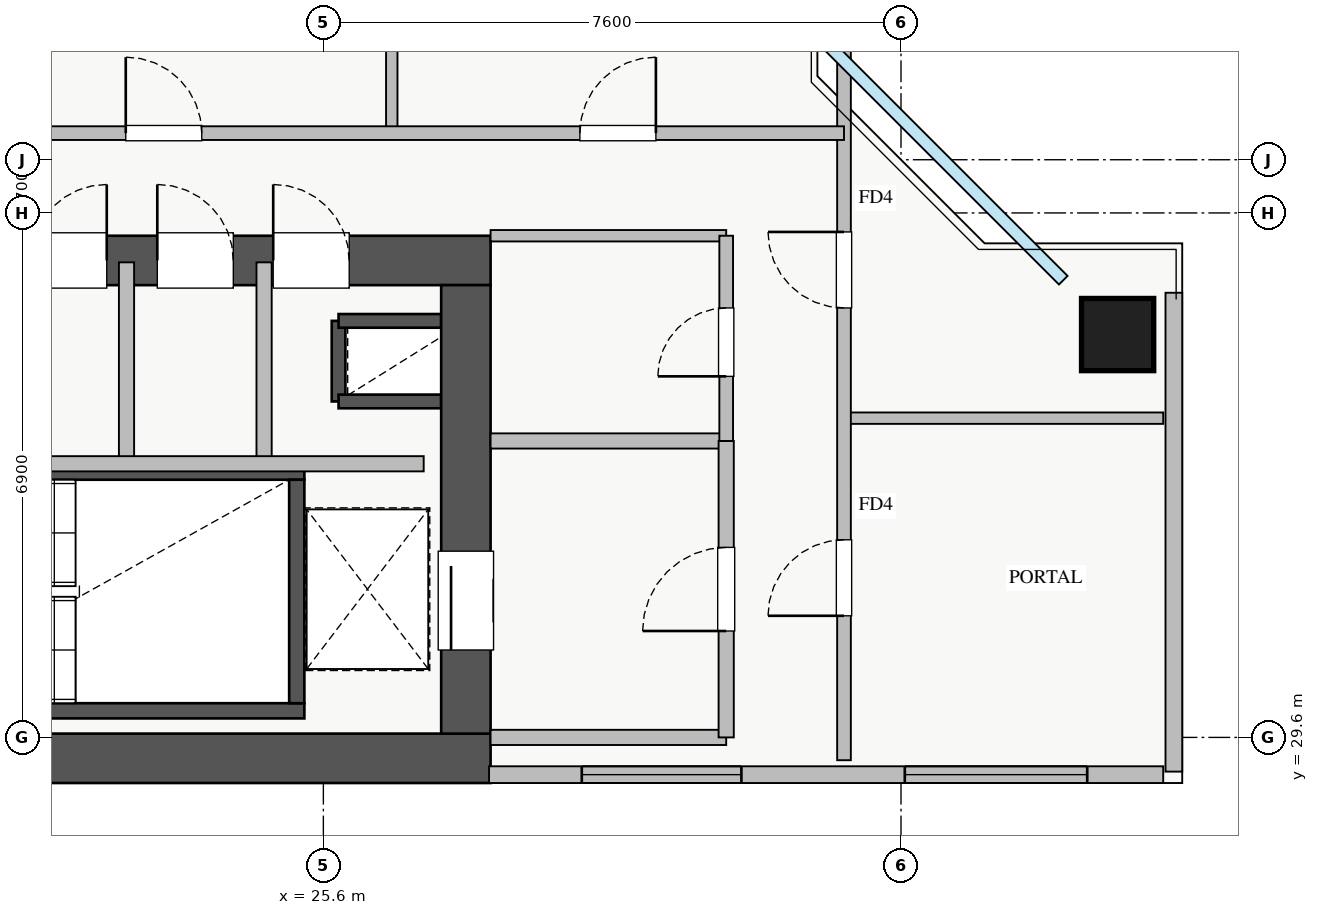
"""IFC4 building model, lengths in metres.
Left out: names, types, materials, properties, quantities, classifications, styles, units other than length and angle.
Written with IfcOpenShell. Run it as: python <this file> out.ifc"""

import sys

from ifc_helpers import new_model, si_unit, direction, frame, frame_2d, origin, origin_2d, place, context, subcontext, project, spatial, rectangle, extrude, source, transform, mapped, element, fill, save


model = new_model("IFC4")
c1 = context("Model", 3, precision=1e-05, world=origin(), true_north=direction((0.0, 1.0)))
c2 = subcontext(c1, "Body", "Model", "MODEL_VIEW")
j1 = project(units=[si_unit("LENGTHUNIT", "METRE"), si_unit("PLANEANGLEUNIT", "RADIAN")], contexts=[c1])
p1 = place(None, origin())
s1 = spatial("IfcSite", under=j1, at=p1, CompositionType="ELEMENT")
p2 = place(p1, origin())
s2 = spatial("IfcBuilding", under=s1, at=p2, CompositionType="ELEMENT")
p3 = place(p2, frame((0.0, 0.0, 163.25)))
s3 = spatial("IfcBuildingStorey", under=s2, at=p3, CompositionType="ELEMENT", Elevation=163.25)
p4 = place(p3, frame((25.8, 34.02, 0.0), z_axis=(0.0, 0.0, 1.0), x_axis=(0.0, 1.0, 0.0)))
e1 = element("IfcWall", 1, at=p4, inside=s3, PredefinedType="SHEAR", context=c2, shape_type="SweptSolid", body=[
    extrude(rectangle(XDim=1.06, YDim=0.18, at=frame_2d((0.53, 0.0))), origin(), (0.0, 0.0, 1.0), 3.07),
])
for number, where, z_axis, x_axis in (
    (2, (25.8, 35.08, 0.0), (0.0, 0.0, 1.0), (1.0, 0.0, 0.0)),
    (3, (25.8, 34.02, 0.0), (0.0, 0.0, 1.0), (1.0, 0.0, 0.0)),
):
    element("IfcWall", number, at=place(p3, frame(where, z_axis=z_axis, x_axis=x_axis)), inside=s3, PredefinedType="SHEAR", context=c2, shape_type="SweptSolid", body=[
        extrude(rectangle(XDim=1.35, YDim=0.18, at=frame_2d((0.675, 0.0))), origin(), (0.0, 0.0, 1.0), 3.07),
    ])
p5 = place(p3, frame((18.2, 29.95, 0.0), z_axis=(0.0, 0.0, 1.0), x_axis=(1.0, 0.0, 0.0)))
e4 = element("IfcWall", 4, at=p5, inside=s3, PredefinedType="SHEAR", context=c2, shape_type="SweptSolid", body=[
    extrude(rectangle(XDim=7.15, YDim=0.2, at=frame_2d((3.575, 0.0))), origin(), (0.0, 0.0, 1.0), 3.25),
])
p6 = place(p3, frame((18.2, 33.09, 0.0), z_axis=(0.0, 0.0, 1.0), x_axis=(1.0, 0.0, 0.0)))
e5 = element("IfcWall", 5, at=p6, inside=s3, PredefinedType="SHEAR", context=c2, shape_type="SweptSolid", body=[
    extrude(rectangle(XDim=7.15, YDim=0.2, at=frame_2d((3.575, 0.0))), origin(), (0.0, 0.0, 1.0), 3.25),
])
p7 = place(p6, frame((0.35, 0.0, 0.0)))
e6 = element("IfcOpeningElement", 6, at=p7, cuts=e5, PredefinedType="OPENING", context=c2, shape_type="SweptSolid", body=[
    extrude(rectangle(XDim=1.1, YDim=2.05, at=frame_2d((0.55, 1.025))), frame((0.0, 0.11, 0.0), z_axis=(0.0, -1.0, 0.0), x_axis=(1.0, 0.0, 0.0)), (0.0, 0.0, 1.0), 0.22),
])
p8 = place(p3, frame((25.25, 30.05, 0.0), z_axis=(0.0, 0.0, 1.0), x_axis=(0.0, 1.0, 0.0)))
e7 = element("IfcWall", 7, at=p8, inside=s3, PredefinedType="SHEAR", context=c2, shape_type="SweptSolid", body=[
    extrude(rectangle(XDim=2.94, YDim=0.2, at=frame_2d((1.47, 0.0))), origin(), (0.0, 0.0, 1.0), 3.25),
])
p9 = place(p3, frame((10.2, 29.325, 0.0), z_axis=(0.0, 0.0, 1.0), x_axis=(1.0, 0.0, 0.0)))
e8 = element("IfcWall", 8, at=p9, inside=s3, PredefinedType="SHEAR", context=c2, shape_type="SweptSolid", body=[
    extrude(rectangle(XDim=17.6, YDim=0.65, at=frame_2d((8.8, 0.0))), origin(), (0.0, 0.0, 1.0), 3.25),
])
p10 = place(p3, frame((10.2, 35.875, 0.0), z_axis=(0.0, 0.0, 1.0), x_axis=(1.0, 0.0, 0.0)))
e9 = element("IfcWall", 9, at=p10, inside=s3, PredefinedType="SHEAR", context=c2, shape_type="SweptSolid", body=[
    extrude(rectangle(XDim=17.6, YDim=0.65, at=frame_2d((8.8, 0.0))), origin(), (0.0, 0.0, 1.0), 3.25),
])
p11 = place(p10, frame((1.15, 0.0, 0.0)))
e10 = element("IfcOpeningElement", 10, at=p11, cuts=e9, PredefinedType="OPENING", context=c2, shape_type="SweptSolid", body=[
    extrude(rectangle(XDim=1.1, YDim=2.05, at=frame_2d((0.55, 1.025))), frame((0.0, 0.335, 0.0), z_axis=(0.0, -1.0, 0.0), x_axis=(1.0, 0.0, 0.0)), (0.0, 0.0, 1.0), 0.67),
])
p12 = place(p10, frame((8.3, 0.0, 0.0)))
e11 = element("IfcOpeningElement", 11, at=p12, cuts=e9, PredefinedType="OPENING", context=c2, shape_type="SweptSolid", body=[
    extrude(rectangle(XDim=1.1, YDim=2.05, at=frame_2d((0.55, 1.025))), frame((0.0, 0.335, 0.0), z_axis=(0.0, -1.0, 0.0), x_axis=(1.0, 0.0, 0.0)), (0.0, 0.0, 1.0), 0.67),
])
p13 = place(p10, frame((4.9, 0.0, 0.0)))
e12 = element("IfcOpeningElement", 12, at=p13, cuts=e9, PredefinedType="OPENING", context=c2, shape_type="SweptSolid", body=[
    extrude(rectangle(XDim=1.1, YDim=2.05, at=frame_2d((0.55, 1.025))), frame((0.0, 0.335, 0.0), z_axis=(0.0, -1.0, 0.0), x_axis=(1.0, 0.0, 0.0)), (0.0, 0.0, 1.0), 0.67),
])
p14 = place(p10, frame((14.74, 0.0, 0.0)))
e13 = element("IfcOpeningElement", 13, at=p14, cuts=e9, PredefinedType="OPENING", context=c2, shape_type="SweptSolid", body=[
    extrude(rectangle(XDim=1.0, YDim=2.05, at=frame_2d((0.5, 1.025))), frame((0.0, 0.335, 0.0), z_axis=(0.0, -1.0, 0.0), x_axis=(1.0, 0.0, 0.0)), (0.0, 0.0, 1.0), 0.67),
])
p15 = place(p10, frame((10.005, 0.0, 0.0)))
e14 = element("IfcOpeningElement", 14, at=p15, cuts=e9, PredefinedType="OPENING", context=c2, shape_type="SweptSolid", body=[
    extrude(rectangle(XDim=1.0, YDim=2.05, at=frame_2d((0.5, 1.025))), frame((0.0, 0.335, 0.0), z_axis=(0.0, -1.0, 0.0), x_axis=(1.0, 0.0, 0.0)), (0.0, 0.0, 1.0), 0.67),
])
p16 = place(p10, frame((11.55, 0.0, 0.0)))
e15 = element("IfcOpeningElement", 15, at=p16, cuts=e9, PredefinedType="OPENING", context=c2, shape_type="SweptSolid", body=[
    extrude(rectangle(XDim=1.0, YDim=2.05, at=frame_2d((0.5, 1.025))), frame((0.0, 0.335, 0.0), z_axis=(0.0, -1.0, 0.0), x_axis=(1.0, 0.0, 0.0)), (0.0, 0.0, 1.0), 0.67),
])
p17 = place(p10, frame((13.215, 0.0, 0.0)))
e16 = element("IfcOpeningElement", 16, at=p17, cuts=e9, PredefinedType="OPENING", context=c2, shape_type="SweptSolid", body=[
    extrude(rectangle(XDim=1.0, YDim=2.05, at=frame_2d((0.5, 1.025))), frame((0.0, 0.335, 0.0), z_axis=(0.0, -1.0, 0.0), x_axis=(1.0, 0.0, 0.0)), (0.0, 0.0, 1.0), 0.67),
])
p18 = place(p3, frame((27.475, 29.65, 0.0), z_axis=(0.0, 0.0, 1.0), x_axis=(0.0, 1.0, 0.0)))
e17 = element("IfcWall", 17, at=p18, inside=s3, PredefinedType="SHEAR", context=c2, shape_type="SweptSolid", body=[
    extrude(rectangle(XDim=5.9, YDim=0.65, at=frame_2d((2.95, 0.0))), origin(), (0.0, 0.0, 1.0), 3.25),
])
p19 = place(p18, frame((1.1, 0.0, 0.0)))
e18 = element("IfcOpeningElement", 18, at=p19, cuts=e17, PredefinedType="OPENING", context=c2, shape_type="SweptSolid", body=[
    extrude(rectangle(XDim=1.3, YDim=2.05, at=frame_2d((0.65, 1.025))), frame((0.0, 0.335, 0.0), z_axis=(0.0, -1.0, 0.0), x_axis=(1.0, 0.0, 0.0)), (0.0, 0.0, 1.0), 0.67),
])
m1 = source(origin(), c2, "Body", "SweptSolid", [
    extrude(rectangle(XDim=0.95, YDim=0.95, at=origin_2d()), origin(), (0.0, 0.0, 1.0), 3.25),
])
p20 = place(p3, frame((36.05, 34.9, 0.0), z_axis=(0.0, 0.0, 1.0), x_axis=(1.0, 0.0, 0.0)))
e19 = element("IfcColumn", 19, at=p20, inside=s3, PredefinedType="COLUMN", context=c2, shape_type="MappedRepresentation", body=[
    mapped(m1, transform((0.0, 0.0, 0.0), x_axis=(1.0, 0.0, 0.0), y_axis=(0.0, 1.0, 0.0), z_axis=(0.0, 0.0, 1.0), scale=1.0)),
])
p21 = place(p3, frame((27.78, 29.11, 0.0), z_axis=(0.0, 0.0, 1.0), x_axis=(1.0, 0.0, 0.0)))
e20 = element("IfcWall", 20, at=p21, inside=s3, PredefinedType="STANDARD", context=c2, shape_type="SweptSolid", body=[
    extrude(rectangle(XDim=8.87, YDim=0.22, at=frame_2d((4.435, 0.0))), origin(), (0.0, 0.0, 1.0), 2.61),
])
p22 = place(p21, frame((1.22, 0.0, 0.9)))
e21 = element("IfcOpeningElement", 21, at=p22, cuts=e20, PredefinedType="OPENING", context=c2, shape_type="SweptSolid", body=[
    extrude(rectangle(XDim=2.1, YDim=1.48, at=frame_2d((1.05, 0.74))), frame((0.0, 0.12, 0.0), z_axis=(0.0, -1.0, 0.0), x_axis=(1.0, 0.0, 0.0)), (0.0, 0.0, 1.0), 0.24),
])
p23 = place(p21, frame((5.47, 0.0, 0.9)))
e22 = element("IfcOpeningElement", 22, at=p23, cuts=e20, PredefinedType="OPENING", context=c2, shape_type="SweptSolid", body=[
    extrude(rectangle(XDim=2.4, YDim=1.48, at=frame_2d((1.2, 0.74))), frame((0.0, 0.12, 0.0), z_axis=(0.0, -1.0, 0.0), x_axis=(1.0, 0.0, 0.0)), (0.0, 0.0, 1.0), 0.24),
])
p24 = place(p3, frame((36.79, 29.15, 0.0), z_axis=(0.0, 0.0, 1.0), x_axis=(0.0, 1.0, 0.0)))
e23 = element("IfcWall", 23, at=p24, inside=s3, PredefinedType="STANDARD", context=c2, shape_type="SweptSolid", body=[
    extrude(rectangle(XDim=6.3, YDim=0.22, at=frame_2d((3.15, 0.0))), origin(), (0.0, 0.0, 1.0), 2.61),
])
for number, where, z_axis, x_axis in (
    (24, (27.8, 29.6, 0.0), (0.0, 0.0, 1.0), (1.0, 0.0, 0.0)),
    (25, (27.8, 33.5, 0.0), (0.0, 0.0, 1.0), (1.0, 0.0, 0.0)),
):
    element("IfcWall", number, at=place(p3, frame(where, z_axis=z_axis, x_axis=x_axis)), inside=s3, PredefinedType="PARTITIONING", context=c2, shape_type="SweptSolid", body=[
        extrude(rectangle(XDim=3.1, YDim=0.2, at=frame_2d((1.55, 0.0))), origin(), (0.0, 0.0, 1.0), 3.07),
    ])
p25 = place(p3, frame((30.9, 29.6, 0.0), z_axis=(0.0, 0.0, 1.0), x_axis=(0.0, 1.0, 0.0)))
e26 = element("IfcWall", 26, at=p25, inside=s3, PredefinedType="PARTITIONING", context=c2, shape_type="SweptSolid", body=[
    extrude(rectangle(XDim=3.9, YDim=0.2, at=frame_2d((1.95, 0.0))), origin(), (0.0, 0.0, 1.0), 3.07),
])
p26 = place(p25, frame((1.4, 0.0, 0.0)))
e27 = element("IfcOpeningElement", 27, at=p26, cuts=e26, PredefinedType="OPENING", context=c2, shape_type="SweptSolid", body=[
    extrude(rectangle(XDim=1.1, YDim=2.05, at=frame_2d((0.55, 1.025))), frame((0.0, 0.11, 0.0), z_axis=(0.0, -1.0, 0.0), x_axis=(1.0, 0.0, 0.0)), (0.0, 0.0, 1.0), 0.22),
])
for number, where, z_axis, x_axis in (
    (28, (24.82, 33.2, 0.0), (0.0, 0.0, 1.0), (0.0, 1.0, 0.0)),
    (29, (23.01, 33.2, 0.0), (0.0, 0.0, 1.0), (0.0, 1.0, 0.0)),
):
    element("IfcWall", number, at=place(p3, frame(where, z_axis=z_axis, x_axis=x_axis)), inside=s3, PredefinedType="PARTITIONING", context=c2, shape_type="SweptSolid", body=[
        extrude(rectangle(XDim=2.65, YDim=0.2, at=frame_2d((1.325, 0.0))), origin(), (0.0, 0.0, 1.0), 3.07),
    ])
p27 = place(p3, frame((21.75, 33.2, 0.0), z_axis=(0.0, 0.0, 1.0), x_axis=(1.0, 0.0, 0.0)))
e30 = element("IfcWall", 30, at=p27, inside=s3, PredefinedType="PARTITIONING", context=c2, shape_type="SweptSolid", body=[
    extrude(rectangle(XDim=5.17, YDim=0.2, at=frame_2d((2.585, 0.0))), origin(), (0.0, 0.0, 1.0), 3.07),
])
p28 = place(p3, frame((27.8, 36.2, 0.0), z_axis=(0.0, 0.0, 1.0), x_axis=(1.0, 0.0, 0.0)))
e31 = element("IfcWall", 31, at=p28, inside=s3, PredefinedType="PARTITIONING", context=c2, shape_type="SweptSolid", body=[
    extrude(rectangle(XDim=3.1, YDim=0.15, at=frame_2d((1.55, 0.0))), origin(), (0.0, 0.0, 1.0), 3.07),
])
p29 = place(p3, frame((30.9, 33.5, 0.0), z_axis=(0.0, 0.0, 1.0), x_axis=(0.0, 1.0, 0.0)))
e32 = element("IfcWall", 32, at=p29, inside=s3, PredefinedType="PARTITIONING", context=c2, shape_type="SweptSolid", body=[
    extrude(rectangle(XDim=2.7, YDim=0.18, at=frame_2d((1.35, 0.0))), origin(), (0.0, 0.0, 1.0), 2.565),
])
p30 = place(p29, frame((0.85, 0.0, 0.0)))
e33 = element("IfcOpeningElement", 33, at=p30, cuts=e32, PredefinedType="OPENING", context=c2, shape_type="SweptSolid", body=[
    extrude(rectangle(XDim=0.9, YDim=2.05, at=frame_2d((0.45, 1.025))), frame((0.0, 0.1, 0.0), z_axis=(0.0, -1.0, 0.0), x_axis=(1.0, 0.0, 0.0)), (0.0, 0.0, 1.0), 0.2),
])
p31 = place(p3, frame((32.45, 33.8, 0.0), z_axis=(0.0, 0.0, 1.0), x_axis=(1.0, 0.0, 0.0)))
e34 = element("IfcWall", 34, at=p31, inside=s3, PredefinedType="PARTITIONING", context=c2, shape_type="SweptSolid", body=[
    extrude(rectangle(XDim=4.2, YDim=0.15, at=frame_2d((2.1, 0.0))), origin(), (0.0, 0.0, 1.0), 3.07),
])
p32 = place(p3, frame((32.45, 29.3, 0.0), z_axis=(0.0, 0.0, 1.0), x_axis=(0.0, 1.0, 0.0)))
e35 = element("IfcWall", 35, at=p32, inside=s3, PredefinedType="PARTITIONING", context=c2, shape_type="SweptSolid", body=[
    extrude(rectangle(XDim=11.35, YDim=0.18, at=frame_2d((5.675, 0.0))), origin(), (0.0, 0.0, 1.0), 3.07),
])
p33 = place(p32, frame((1.9, 0.0, 0.0)))
e36 = element("IfcOpeningElement", 36, at=p33, cuts=e35, PredefinedType="OPENING", context=c2, shape_type="SweptSolid", body=[
    extrude(rectangle(XDim=1.0, YDim=2.05, at=frame_2d((0.5, 1.025))), frame((0.0, 0.1, 0.0), z_axis=(0.0, -1.0, 0.0), x_axis=(1.0, 0.0, 0.0)), (0.0, 0.0, 1.0), 0.2),
])
p34 = place(p32, frame((5.95, 0.0, 0.0)))
e37 = element("IfcOpeningElement", 37, at=p34, cuts=e35, PredefinedType="OPENING", context=c2, shape_type="SweptSolid", body=[
    extrude(rectangle(XDim=1.0, YDim=2.05, at=frame_2d((0.5, 1.025))), frame((0.0, 0.1, 0.0), z_axis=(0.0, -1.0, 0.0), x_axis=(1.0, 0.0, 0.0)), (0.0, 0.0, 1.0), 0.2),
])
p35 = place(p3, frame((26.5, 37.55, 0.0), z_axis=(0.0, 0.0, 1.0), x_axis=(0.0, 1.0, 0.0)))
e38 = element("IfcWall", 38, at=p35, inside=s3, PredefinedType="PARTITIONING", context=c2, shape_type="SweptSolid", body=[
    extrude(rectangle(XDim=3.1, YDim=0.15, at=frame_2d((1.55, 0.0))), origin(), (0.0, 0.0, 1.0), 3.07),
])
p36 = place(p3, frame((8.65, 37.55, 0.0), z_axis=(0.0, 0.0, 1.0), x_axis=(1.0, 0.0, 0.0)))
e39 = element("IfcWall", 39, at=p36, inside=s3, PredefinedType="PARTITIONING", context=c2, shape_type="SweptSolid", body=[
    extrude(rectangle(XDim=23.8, YDim=0.18, at=frame_2d((11.9, 0.0))), origin(), (0.0, 0.0, 1.0), 3.07),
])
p37 = place(p36, frame((2.425, 0.0, 0.0)))
e40 = element("IfcOpeningElement", 40, at=p37, cuts=e39, PredefinedType="OPENING", context=c2, shape_type="SweptSolid", body=[
    extrude(rectangle(XDim=1.0, YDim=2.05, at=frame_2d((0.5, 1.025))), frame((0.0, 0.1, 0.0), z_axis=(0.0, -1.0, 0.0), x_axis=(1.0, 0.0, 0.0)), (0.0, 0.0, 1.0), 0.2),
])
p38 = place(p36, frame((8.35, 0.0, 0.0)))
e41 = element("IfcOpeningElement", 41, at=p38, cuts=e39, PredefinedType="OPENING", context=c2, shape_type="SweptSolid", body=[
    extrude(rectangle(XDim=1.0, YDim=2.05, at=frame_2d((0.5, 1.025))), frame((0.0, 0.1, 0.0), z_axis=(0.0, -1.0, 0.0), x_axis=(1.0, 0.0, 0.0)), (0.0, 0.0, 1.0), 0.2),
])
p39 = place(p36, frame((14.35, 0.0, 0.0)))
e42 = element("IfcOpeningElement", 42, at=p39, cuts=e39, PredefinedType="OPENING", context=c2, shape_type="SweptSolid", body=[
    extrude(rectangle(XDim=1.0, YDim=2.05, at=frame_2d((0.5, 1.025))), frame((0.0, 0.1, 0.0), z_axis=(0.0, -1.0, 0.0), x_axis=(1.0, 0.0, 0.0)), (0.0, 0.0, 1.0), 0.2),
])
p40 = place(p36, frame((20.325, 0.0, 0.0)))
e43 = element("IfcOpeningElement", 43, at=p40, cuts=e39, PredefinedType="OPENING", context=c2, shape_type="SweptSolid", body=[
    extrude(rectangle(XDim=1.0, YDim=2.05, at=frame_2d((0.5, 1.025))), frame((0.0, 0.1, 0.0), z_axis=(0.0, -1.0, 0.0), x_axis=(1.0, 0.0, 0.0)), (0.0, 0.0, 1.0), 0.2),
])
m2 = source(origin(), c2, "Body", "SweptSolid", [
    extrude(rectangle(XDim=2.1, YDim=1.48, at=frame_2d((1.05, 0.74))), frame((0.0, 0.03, 0.0), z_axis=(0.0, -1.0, 0.0), x_axis=(1.0, 0.0, 0.0)), (0.0, 0.0, 1.0), 0.06),
])
p41 = place(p22, origin())
e44 = element("IfcWindow", 44, at=p41, inside=s3, PartitioningType="TRIPLE_PANEL_VERTICAL", PredefinedType="WINDOW", context=c2, shape_type="MappedRepresentation", body=[
    mapped(m2, transform((0.0, 0.0, 0.0), x_axis=(1.0, 0.0, 0.0), y_axis=(0.0, 1.0, 0.0), z_axis=(0.0, 0.0, 1.0), scale=1.0)),
])
fill(e21, e44)
m3 = source(origin(), c2, "Body", "SweptSolid", [
    extrude(rectangle(XDim=2.4, YDim=1.48, at=frame_2d((1.2, 0.74))), frame((0.0, 0.03, 0.0), z_axis=(0.0, -1.0, 0.0), x_axis=(1.0, 0.0, 0.0)), (0.0, 0.0, 1.0), 0.06),
])
p42 = place(p23, origin())
e45 = element("IfcWindow", 45, at=p42, inside=s3, PartitioningType="TRIPLE_PANEL_VERTICAL", PredefinedType="WINDOW", context=c2, shape_type="MappedRepresentation", body=[
    mapped(m3, transform((0.0, 0.0, 0.0), x_axis=(1.0, 0.0, 0.0), y_axis=(0.0, 1.0, 0.0), z_axis=(0.0, 0.0, 1.0), scale=1.0)),
])
fill(e22, e45)
m4 = source(origin(), c2, "Body", "SweptSolid", [
    extrude(rectangle(XDim=1.3, YDim=2.05, at=frame_2d((0.65, 1.025))), frame((0.0, 0.025, 0.0), z_axis=(0.0, -1.0, 0.0), x_axis=(1.0, 0.0, 0.0)), (0.0, 0.0, 1.0), 0.05),
])
p43 = place(p19, origin())
e46 = element("IfcDoor", 46, at=p43, inside=s3, OperationType="SLIDING_TO_LEFT", PredefinedType="DOOR", context=c2, shape_type="MappedRepresentation", body=[
    mapped(m4, transform((0.0, 0.0, 0.0), x_axis=(1.0, 0.0, 0.0), y_axis=(0.0, 1.0, 0.0), z_axis=(0.0, 0.0, 1.0), scale=1.0)),
])
fill(e18, e46)
m5 = source(origin(), c2, "Body", "SweptSolid", [
    extrude(rectangle(XDim=1.0, YDim=2.05, at=frame_2d((0.5, 1.025))), frame((0.0, 0.025, 0.0), z_axis=(0.0, -1.0, 0.0), x_axis=(1.0, 0.0, 0.0)), (0.0, 0.0, 1.0), 0.05),
])
p44 = place(p14, origin())
e47 = element("IfcDoor", 47, at=p44, inside=s3, OperationType="SINGLE_SWING_LEFT", PredefinedType="DOOR", context=c2, shape_type="MappedRepresentation", body=[
    mapped(m5, transform((0.0, 0.0, 0.0), x_axis=(1.0, 0.0, 0.0), y_axis=(0.0, 1.0, 0.0), z_axis=(0.0, 0.0, 1.0), scale=1.0)),
])
fill(e13, e47)
p45 = place(p16, origin())
e48 = element("IfcDoor", 48, at=p45, inside=s3, OperationType="SINGLE_SWING_RIGHT", PredefinedType="DOOR", context=c2, shape_type="MappedRepresentation", body=[
    mapped(m5, transform((0.0, 0.0, 0.0), x_axis=(1.0, 0.0, 0.0), y_axis=(0.0, 1.0, 0.0), z_axis=(0.0, 0.0, 1.0), scale=1.0)),
])
fill(e15, e48)
p46 = place(p17, origin())
e49 = element("IfcDoor", 49, at=p46, inside=s3, OperationType="SINGLE_SWING_LEFT", PredefinedType="DOOR", context=c2, shape_type="MappedRepresentation", body=[
    mapped(m5, transform((0.0, 0.0, 0.0), x_axis=(1.0, 0.0, 0.0), y_axis=(0.0, 1.0, 0.0), z_axis=(0.0, 0.0, 1.0), scale=1.0)),
])
fill(e16, e49)
m6 = source(origin(), c2, "Body", "SweptSolid", [
    extrude(rectangle(XDim=1.1, YDim=2.05, at=frame_2d((0.55, 1.025))), frame((0.0, 0.025, 0.0), z_axis=(0.0, -1.0, 0.0), x_axis=(1.0, 0.0, 0.0)), (0.0, 0.0, 1.0), 0.05),
])
p47 = place(p26, origin())
e50 = element("IfcDoor", 50, at=p47, inside=s3, OperationType="SINGLE_SWING_LEFT", PredefinedType="DOOR", context=c2, shape_type="MappedRepresentation", body=[
    mapped(m6, transform((0.0, 0.0, 0.0), x_axis=(1.0, 0.0, 0.0), y_axis=(0.0, 1.0, 0.0), z_axis=(0.0, 0.0, 1.0), scale=1.0)),
])
fill(e27, e50)
m7 = source(origin(), c2, "Body", "SweptSolid", [
    extrude(rectangle(XDim=0.9, YDim=2.05, at=frame_2d((0.45, 1.025))), frame((0.0, 0.025, 0.0), z_axis=(0.0, -1.0, 0.0), x_axis=(1.0, 0.0, 0.0)), (0.0, 0.0, 1.0), 0.05),
])
p48 = place(p30, origin())
e51 = element("IfcDoor", 51, at=p48, inside=s3, OperationType="SINGLE_SWING_LEFT", PredefinedType="DOOR", context=c2, shape_type="MappedRepresentation", body=[
    mapped(m7, transform((0.0, 0.0, 0.0), x_axis=(1.0, 0.0, 0.0), y_axis=(0.0, 1.0, 0.0), z_axis=(0.0, 0.0, 1.0), scale=1.0)),
])
fill(e33, e51)
p49 = place(p33, origin())
e52 = element("IfcDoor", 52, at=p49, inside=s3, OperationType="SINGLE_SWING_LEFT", PredefinedType="DOOR", context=c2, shape_type="MappedRepresentation", body=[
    mapped(m5, transform((0.0, 0.0, 0.0), x_axis=(1.0, 0.0, 0.0), y_axis=(0.0, 1.0, 0.0), z_axis=(0.0, 0.0, 1.0), scale=1.0)),
])
fill(e36, e52)
p50 = place(p34, origin())
e53 = element("IfcDoor", 53, at=p50, inside=s3, OperationType="SINGLE_SWING_RIGHT", PredefinedType="DOOR", context=c2, shape_type="MappedRepresentation", body=[
    mapped(m5, transform((0.0, 0.0, 0.0), x_axis=(1.0, 0.0, 0.0), y_axis=(0.0, 1.0, 0.0), z_axis=(0.0, 0.0, 1.0), scale=1.0)),
])
fill(e37, e53)
p51 = place(p39, origin())
e54 = element("IfcDoor", 54, at=p51, inside=s3, OperationType="SINGLE_SWING_LEFT", PredefinedType="DOOR", context=c2, shape_type="MappedRepresentation", body=[
    mapped(m5, transform((0.0, 0.0, 0.0), x_axis=(1.0, 0.0, 0.0), y_axis=(0.0, 1.0, 0.0), z_axis=(0.0, 0.0, 1.0), scale=1.0)),
])
fill(e42, e54)
p52 = place(p40, origin())
e55 = element("IfcDoor", 55, at=p52, inside=s3, OperationType="SINGLE_SWING_RIGHT", PredefinedType="DOOR", context=c2, shape_type="MappedRepresentation", body=[
    mapped(m5, transform((0.0, 0.0, 0.0), x_axis=(1.0, 0.0, 0.0), y_axis=(0.0, 1.0, 0.0), z_axis=(0.0, 0.0, 1.0), scale=1.0)),
])
fill(e43, e55)
save(model, sys.argv[1])
